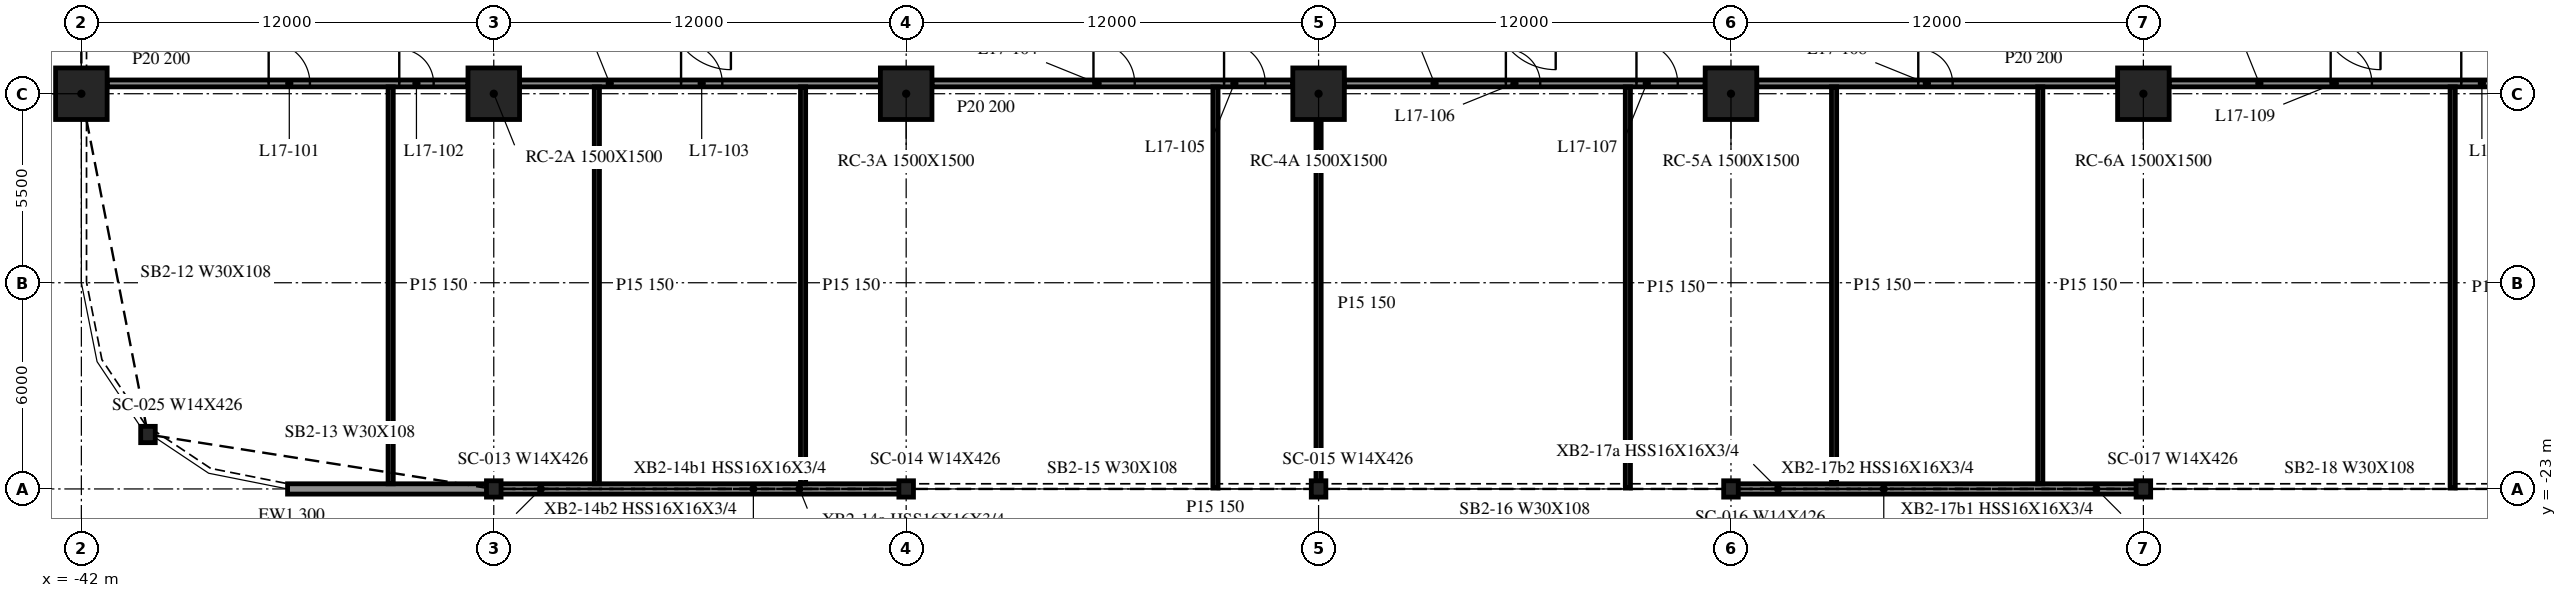
"""IFC4 building model, lengths in metres.
Left out: names, types, materials, properties, quantities, classifications, styles, units other than length and angle.
Written with IfcOpenShell. Run it as: python <this file> out.ifc"""

import sys

from ifc_helpers import new_model, si_unit, direction, frame, frame_2d, origin, origin_2d, place, context, subcontext, project, spatial, rectangle, i_section, extrude, element, fill, save


model = new_model("IFC4")
c1 = context("Model", 3, precision=1e-05, world=origin(), true_north=direction((0.0, 1.0)))
c2 = subcontext(c1, "Body", "Model", "MODEL_VIEW")
j1 = project(units=[si_unit("LENGTHUNIT", "METRE"), si_unit("PLANEANGLEUNIT", "RADIAN")], contexts=[c1])
p1 = place(None, origin())
s1 = spatial("IfcSite", under=j1, at=p1, CompositionType="ELEMENT")
p2 = place(p1, origin())
s2 = spatial("IfcBuilding", under=s1, at=p2, CompositionType="ELEMENT")
p3 = place(p2, frame((0.0, 0.0, 76.1)))
s3 = spatial("IfcBuildingStorey", under=s2, at=p3, CompositionType="ELEMENT", Elevation=76.1)
for number, where, z_axis, x_axis in (
    (1, (-42.0, -11.5, -0.34), (0.0, 0.0, 1.0), (1.0, 0.0, 0.0)),
    (2, (-30.0, -11.5, -0.34), (0.0, 0.0, 1.0), (1.0, 0.0, 0.0)),
    (3, (-18.0, -11.5, -0.34), (0.0, 0.0, 1.0), (1.0, 0.0, 0.0)),
    (4, (-6.0, -11.5, -0.34), (0.0, 0.0, 1.0), (1.0, 0.0, 0.0)),
    (5, (6.0, -11.5, -0.34), (0.0, 0.0, 1.0), (1.0, 0.0, 0.0)),
    (6, (18.0, -11.5, -0.34), (0.0, 0.0, 1.0), (1.0, 0.0, 0.0)),
):
    element("IfcColumn", number, at=place(p3, frame(where, z_axis=z_axis, x_axis=x_axis)), inside=s3, PredefinedType="COLUMN", context=c2, shape_type="SweptSolid", body=[
        extrude(rectangle(XDim=1.5, YDim=1.5, at=origin_2d()), origin(), (0.0, 0.0, 1.0), 4.09),
    ])
for number, where, z_axis, x_axis in (
    (7, (-40.062, -21.416, -0.34), (0.0, 0.0, 1.0), (1.0, 0.0, 0.0)),
    (8, (-30.0, -23.0, -0.34), (0.0, 0.0, 1.0), (1.0, 0.0, 0.0)),
    (9, (-18.0, -23.0, -0.34), (0.0, 0.0, 1.0), (1.0, 0.0, 0.0)),
    (10, (-6.0, -23.0, -0.34), (0.0, 0.0, 1.0), (1.0, 0.0, 0.0)),
    (11, (6.0, -23.0, -0.34), (0.0, 0.0, 1.0), (1.0, 0.0, 0.0)),
    (12, (18.0, -23.0, -0.34), (0.0, 0.0, 1.0), (1.0, 0.0, 0.0)),
):
    element("IfcColumn", number, at=place(p3, frame(where, z_axis=z_axis, x_axis=x_axis)), inside=s3, PredefinedType="COLUMN", context=c2, shape_type="SweptSolid", body=[
        extrude(i_section(OverallWidth=0.424, OverallDepth=0.475, WebThickness=0.048, FlangeThickness=0.077, at=origin_2d()), origin(), (0.0, 0.0, 1.0), 4.09),
    ])
p4 = place(p3, frame((-36.0, -23.0, 0.0), z_axis=(0.0, 0.0, 1.0), x_axis=(1.0, 0.0, 0.0)))
e13 = element("IfcWall", 13, at=p4, inside=s3, PredefinedType="NOTDEFINED", context=c2, shape_type="SweptSolid", body=[
    extrude(rectangle(XDim=5.976, YDim=0.3, at=frame_2d((2.988, 0.0))), origin(), (0.0, 0.0, 1.0), 3.75),
])
for number, where, z_axis, x_axis in (
    (14, (-29.976, -23.0, 0.0), (0.0, 0.0, 1.0), (1.0, 0.0, 0.0)),
    (15, (6.024, -23.0, 0.0), (0.0, 0.0, 1.0), (1.0, 0.0, 0.0)),
):
    element("IfcWall", number, at=place(p3, frame(where, z_axis=z_axis, x_axis=x_axis)), inside=s3, PredefinedType="NOTDEFINED", context=c2, shape_type="SweptSolid", body=[
        extrude(rectangle(XDim=11.952, YDim=0.3, at=frame_2d((5.976, 0.0))), origin(), (0.0, 0.0, 1.0), 3.75),
    ])
p5 = place(p3, frame((-41.25, -11.2, 0.0), z_axis=(0.0, 0.0, 1.0), x_axis=(1.0, 0.0, 0.0)))
e16 = element("IfcWall", 16, at=p5, inside=s3, PredefinedType="PARTITIONING", context=c2, shape_type="SweptSolid", body=[
    extrude(rectangle(XDim=10.5, YDim=0.2, at=frame_2d((5.25, 0.0))), origin(), (0.0, 0.0, 1.0), 3.75),
])
p6 = place(p5, frame((4.7, 0.0, 0.0)))
e17 = element("IfcOpeningElement", 17, at=p6, cuts=e16, PredefinedType="OPENING", context=c2, shape_type="SweptSolid", body=[
    extrude(rectangle(XDim=1.2, YDim=2.1, at=frame_2d((0.6, 1.05))), frame((0.0, 0.11, 0.0), z_axis=(0.0, -1.0, 0.0), x_axis=(1.0, 0.0, 0.0)), (0.0, 0.0, 1.0), 0.22),
])
p7 = place(p5, frame((8.5, 0.0, 0.0)))
e18 = element("IfcOpeningElement", 18, at=p7, cuts=e16, PredefinedType="OPENING", context=c2, shape_type="SweptSolid", body=[
    extrude(rectangle(XDim=1.0, YDim=2.1, at=frame_2d((0.5, 1.05))), frame((0.0, 0.11, 0.0), z_axis=(0.0, -1.0, 0.0), x_axis=(1.0, 0.0, 0.0)), (0.0, 0.0, 1.0), 0.22),
])
p8 = place(p3, frame((-29.25, -11.2, 0.0), z_axis=(0.0, 0.0, 1.0), x_axis=(1.0, 0.0, 0.0)))
e19 = element("IfcWall", 19, at=p8, inside=s3, PredefinedType="PARTITIONING", context=c2, shape_type="SweptSolid", body=[
    extrude(rectangle(XDim=10.5, YDim=0.2, at=frame_2d((5.25, 0.0))), origin(), (0.0, 0.0, 1.0), 3.75),
])
p9 = place(p8, frame((4.7, 0.0, 0.0)))
e20 = element("IfcOpeningElement", 20, at=p9, cuts=e19, PredefinedType="OPENING", context=c2, shape_type="SweptSolid", body=[
    extrude(rectangle(XDim=1.2, YDim=2.1, at=frame_2d((0.6, 1.05))), frame((0.0, 0.11, 0.0), z_axis=(0.0, -1.0, 0.0), x_axis=(1.0, 0.0, 0.0)), (0.0, 0.0, 1.0), 0.22),
])
p10 = place(p3, frame((-17.25, -11.2, 0.0), z_axis=(0.0, 0.0, 1.0), x_axis=(1.0, 0.0, 0.0)))
e21 = element("IfcWall", 21, at=p10, inside=s3, PredefinedType="PARTITIONING", context=c2, shape_type="SweptSolid", body=[
    extrude(rectangle(XDim=10.5, YDim=0.2, at=frame_2d((5.25, 0.0))), origin(), (0.0, 0.0, 1.0), 3.75),
])
p11 = place(p10, frame((4.7, 0.0, 0.0)))
e22 = element("IfcOpeningElement", 22, at=p11, cuts=e21, PredefinedType="OPENING", context=c2, shape_type="SweptSolid", body=[
    extrude(rectangle(XDim=1.2, YDim=2.1, at=frame_2d((0.6, 1.05))), frame((0.0, 0.11, 0.0), z_axis=(0.0, -1.0, 0.0), x_axis=(1.0, 0.0, 0.0)), (0.0, 0.0, 1.0), 0.22),
])
p12 = place(p10, frame((8.5, 0.0, 0.0)))
e23 = element("IfcOpeningElement", 23, at=p12, cuts=e21, PredefinedType="OPENING", context=c2, shape_type="SweptSolid", body=[
    extrude(rectangle(XDim=1.2, YDim=2.1, at=frame_2d((0.6, 1.05))), frame((0.0, 0.11, 0.0), z_axis=(0.0, -1.0, 0.0), x_axis=(1.0, 0.0, 0.0)), (0.0, 0.0, 1.0), 0.22),
])
p13 = place(p3, frame((-5.25, -11.2, 0.0), z_axis=(0.0, 0.0, 1.0), x_axis=(1.0, 0.0, 0.0)))
e24 = element("IfcWall", 24, at=p13, inside=s3, PredefinedType="PARTITIONING", context=c2, shape_type="SweptSolid", body=[
    extrude(rectangle(XDim=10.5, YDim=0.2, at=frame_2d((5.25, 0.0))), origin(), (0.0, 0.0, 1.0), 3.75),
])
p14 = place(p13, frame((4.7, 0.0, 0.0)))
e25 = element("IfcOpeningElement", 25, at=p14, cuts=e24, PredefinedType="OPENING", context=c2, shape_type="SweptSolid", body=[
    extrude(rectangle(XDim=1.0, YDim=2.1, at=frame_2d((0.5, 1.05))), frame((0.0, 0.11, 0.0), z_axis=(0.0, -1.0, 0.0), x_axis=(1.0, 0.0, 0.0)), (0.0, 0.0, 1.0), 0.22),
])
p15 = place(p13, frame((8.5, 0.0, 0.0)))
e26 = element("IfcOpeningElement", 26, at=p15, cuts=e24, PredefinedType="OPENING", context=c2, shape_type="SweptSolid", body=[
    extrude(rectangle(XDim=1.2, YDim=2.1, at=frame_2d((0.6, 1.05))), frame((0.0, 0.11, 0.0), z_axis=(0.0, -1.0, 0.0), x_axis=(1.0, 0.0, 0.0)), (0.0, 0.0, 1.0), 0.22),
])
p16 = place(p3, frame((6.75, -11.2, 0.0), z_axis=(0.0, 0.0, 1.0), x_axis=(1.0, 0.0, 0.0)))
e27 = element("IfcWall", 27, at=p16, inside=s3, PredefinedType="PARTITIONING", context=c2, shape_type="SweptSolid", body=[
    extrude(rectangle(XDim=10.5, YDim=0.2, at=frame_2d((5.25, 0.0))), origin(), (0.0, 0.0, 1.0), 3.75),
])
p17 = place(p16, frame((4.7, 0.0, 0.0)))
e28 = element("IfcOpeningElement", 28, at=p17, cuts=e27, PredefinedType="OPENING", context=c2, shape_type="SweptSolid", body=[
    extrude(rectangle(XDim=1.0, YDim=2.1, at=frame_2d((0.5, 1.05))), frame((0.0, 0.11, 0.0), z_axis=(0.0, -1.0, 0.0), x_axis=(1.0, 0.0, 0.0)), (0.0, 0.0, 1.0), 0.22),
])
p18 = place(p3, frame((18.75, -11.2, 0.0), z_axis=(0.0, 0.0, 1.0), x_axis=(1.0, 0.0, 0.0)))
e29 = element("IfcWall", 29, at=p18, inside=s3, PredefinedType="PARTITIONING", context=c2, shape_type="SweptSolid", body=[
    extrude(rectangle(XDim=10.5, YDim=0.2, at=frame_2d((5.25, 0.0))), origin(), (0.0, 0.0, 1.0), 3.75),
])
p19 = place(p18, frame((4.7, 0.0, 0.0)))
e30 = element("IfcOpeningElement", 30, at=p19, cuts=e29, PredefinedType="OPENING", context=c2, shape_type="SweptSolid", body=[
    extrude(rectangle(XDim=1.2, YDim=2.1, at=frame_2d((0.6, 1.05))), frame((0.0, 0.11, 0.0), z_axis=(0.0, -1.0, 0.0), x_axis=(1.0, 0.0, 0.0)), (0.0, 0.0, 1.0), 0.22),
])
p20 = place(p18, frame((8.5, 0.0, 0.0)))
e31 = element("IfcOpeningElement", 31, at=p20, cuts=e29, PredefinedType="OPENING", context=c2, shape_type="SweptSolid", body=[
    extrude(rectangle(XDim=1.2, YDim=2.1, at=frame_2d((0.6, 1.05))), frame((0.0, 0.11, 0.0), z_axis=(0.0, -1.0, 0.0), x_axis=(1.0, 0.0, 0.0)), (0.0, 0.0, 1.0), 0.22),
])
for number, where, z_axis, x_axis in (
    (32, (-33.0, -22.85, 0.0), (0.0, 0.0, 1.0), (0.0, 1.0, 0.0)),
    (33, (-27.0, -22.85, 0.0), (0.0, 0.0, 1.0), (0.0, 1.0, 0.0)),
    (34, (-21.0, -22.85, 0.0), (0.0, 0.0, 1.0), (0.0, 1.0, 0.0)),
):
    element("IfcWall", number, at=place(p3, frame(where, z_axis=z_axis, x_axis=x_axis)), inside=s3, PredefinedType="PARTITIONING", context=c2, shape_type="SweptSolid", body=[
        extrude(rectangle(XDim=11.55, YDim=0.15, at=frame_2d((5.775, 0.0))), origin(), (0.0, 0.0, 1.0), 3.75),
    ])
p21 = place(p3, frame((-9.0, -22.975, 0.0), z_axis=(0.0, 0.0, 1.0), x_axis=(0.0, 1.0, 0.0)))
e35 = element("IfcWall", 35, at=p21, inside=s3, PredefinedType="PARTITIONING", context=c2, shape_type="SweptSolid", body=[
    extrude(rectangle(XDim=11.675, YDim=0.15, at=frame_2d((5.837, 0.0))), origin(), (0.0, 0.0, 1.0), 3.75),
])
p22 = place(p3, frame((-6.0, -22.975, 0.0), z_axis=(0.0, 0.0, 1.0), x_axis=(0.0, 1.0, 0.0)))
e36 = element("IfcWall", 36, at=p22, inside=s3, PredefinedType="PARTITIONING", context=c2, shape_type="SweptSolid", body=[
    extrude(rectangle(XDim=10.725, YDim=0.15, at=frame_2d((5.363, 0.0))), origin(), (0.0, 0.0, 1.0), 2.751),
])
p23 = place(p3, frame((3.0, -22.975, 0.0), z_axis=(0.0, 0.0, 1.0), x_axis=(0.0, 1.0, 0.0)))
e37 = element("IfcWall", 37, at=p23, inside=s3, PredefinedType="PARTITIONING", context=c2, shape_type="SweptSolid", body=[
    extrude(rectangle(XDim=11.675, YDim=0.15, at=frame_2d((5.837, 0.0))), origin(), (0.0, 0.0, 1.0), 3.75),
])
for number, where, z_axis, x_axis in (
    (38, (9.0, -22.85, 0.0), (0.0, 0.0, 1.0), (0.0, 1.0, 0.0)),
    (39, (15.0, -22.85, 0.0), (0.0, 0.0, 1.0), (0.0, 1.0, 0.0)),
):
    element("IfcWall", number, at=place(p3, frame(where, z_axis=z_axis, x_axis=x_axis)), inside=s3, PredefinedType="PARTITIONING", context=c2, shape_type="SweptSolid", body=[
        extrude(rectangle(XDim=11.55, YDim=0.15, at=frame_2d((5.775, 0.0))), origin(), (0.0, 0.0, 1.0), 3.75),
    ])
p24 = place(p3, frame((27.0, -22.975, 0.0), z_axis=(0.0, 0.0, 1.0), x_axis=(0.0, 1.0, 0.0)))
e40 = element("IfcWall", 40, at=p24, inside=s3, PredefinedType="PARTITIONING", context=c2, shape_type="SweptSolid", body=[
    extrude(rectangle(XDim=11.675, YDim=0.15, at=frame_2d((5.837, 0.0))), origin(), (0.0, 0.0, 1.0), 3.75),
])
p25 = place(p6, origin())
e41 = element("IfcDoor", 41, at=p25, inside=s3, OperationType="SINGLE_SWING_LEFT", PredefinedType="DOOR", context=c2, shape_type="SweptSolid", body=[
    extrude(rectangle(XDim=1.2, YDim=2.1, at=frame_2d((0.6, 1.05))), frame((0.0, 0.025, 0.0), z_axis=(0.0, -1.0, 0.0), x_axis=(1.0, 0.0, 0.0)), (0.0, 0.0, 1.0), 0.05),
])
fill(e17, e41)
p26 = place(p7, origin())
e42 = element("IfcDoor", 42, at=p26, inside=s3, OperationType="SINGLE_SWING_LEFT", PredefinedType="DOOR", context=c2, shape_type="SweptSolid", body=[
    extrude(rectangle(XDim=1.0, YDim=2.1, at=frame_2d((0.5, 1.05))), frame((0.0, 0.025, 0.0), z_axis=(0.0, -1.0, 0.0), x_axis=(1.0, 0.0, 0.0)), (0.0, 0.0, 1.0), 0.05),
])
fill(e18, e42)
p27 = place(p9, origin())
e43 = element("IfcDoor", 43, at=p27, inside=s3, OperationType="SINGLE_SWING_LEFT", PredefinedType="DOOR", context=c2, shape_type="SweptSolid", body=[
    extrude(rectangle(XDim=1.2, YDim=2.1, at=frame_2d((0.6, 1.05))), frame((0.0, 0.025, 0.0), z_axis=(0.0, -1.0, 0.0), x_axis=(1.0, 0.0, 0.0)), (0.0, 0.0, 1.0), 0.05),
])
fill(e20, e43)
p28 = place(p11, origin())
e44 = element("IfcDoor", 44, at=p28, inside=s3, OperationType="SINGLE_SWING_LEFT", PredefinedType="DOOR", context=c2, shape_type="SweptSolid", body=[
    extrude(rectangle(XDim=1.2, YDim=2.1, at=frame_2d((0.6, 1.05))), frame((0.0, 0.025, 0.0), z_axis=(0.0, -1.0, 0.0), x_axis=(1.0, 0.0, 0.0)), (0.0, 0.0, 1.0), 0.05),
])
fill(e22, e44)
p29 = place(p12, origin())
e45 = element("IfcDoor", 45, at=p29, inside=s3, OperationType="SINGLE_SWING_LEFT", PredefinedType="DOOR", context=c2, shape_type="SweptSolid", body=[
    extrude(rectangle(XDim=1.2, YDim=2.1, at=frame_2d((0.6, 1.05))), frame((0.0, 0.025, 0.0), z_axis=(0.0, -1.0, 0.0), x_axis=(1.0, 0.0, 0.0)), (0.0, 0.0, 1.0), 0.05),
])
fill(e23, e45)
p30 = place(p14, origin())
e46 = element("IfcDoor", 46, at=p30, inside=s3, OperationType="SINGLE_SWING_RIGHT", PredefinedType="DOOR", context=c2, shape_type="SweptSolid", body=[
    extrude(rectangle(XDim=1.0, YDim=2.1, at=frame_2d((0.5, 1.05))), frame((0.0, 0.025, 0.0), z_axis=(0.0, -1.0, 0.0), x_axis=(1.0, 0.0, 0.0)), (0.0, 0.0, 1.0), 0.05),
])
fill(e25, e46)
p31 = place(p15, origin())
e47 = element("IfcDoor", 47, at=p31, inside=s3, OperationType="SINGLE_SWING_LEFT", PredefinedType="DOOR", context=c2, shape_type="SweptSolid", body=[
    extrude(rectangle(XDim=1.2, YDim=2.1, at=frame_2d((0.6, 1.05))), frame((0.0, 0.025, 0.0), z_axis=(0.0, -1.0, 0.0), x_axis=(1.0, 0.0, 0.0)), (0.0, 0.0, 1.0), 0.05),
])
fill(e26, e47)
p32 = place(p17, origin())
e48 = element("IfcDoor", 48, at=p32, inside=s3, OperationType="SINGLE_SWING_RIGHT", PredefinedType="DOOR", context=c2, shape_type="SweptSolid", body=[
    extrude(rectangle(XDim=1.0, YDim=2.1, at=frame_2d((0.5, 1.05))), frame((0.0, 0.025, 0.0), z_axis=(0.0, -1.0, 0.0), x_axis=(1.0, 0.0, 0.0)), (0.0, 0.0, 1.0), 0.05),
])
fill(e28, e48)
p33 = place(p19, origin())
e49 = element("IfcDoor", 49, at=p33, inside=s3, OperationType="SINGLE_SWING_LEFT", PredefinedType="DOOR", context=c2, shape_type="SweptSolid", body=[
    extrude(rectangle(XDim=1.2, YDim=2.1, at=frame_2d((0.6, 1.05))), frame((0.0, 0.025, 0.0), z_axis=(0.0, -1.0, 0.0), x_axis=(1.0, 0.0, 0.0)), (0.0, 0.0, 1.0), 0.05),
])
fill(e30, e49)
p34 = place(p20, origin())
e50 = element("IfcDoor", 50, at=p34, inside=s3, OperationType="SINGLE_SWING_LEFT", PredefinedType="DOOR", context=c2, shape_type="SweptSolid", body=[
    extrude(rectangle(XDim=1.2, YDim=2.1, at=frame_2d((0.6, 1.05))), frame((0.0, 0.025, 0.0), z_axis=(0.0, -1.0, 0.0), x_axis=(1.0, 0.0, 0.0)), (0.0, 0.0, 1.0), 0.05),
])
fill(e31, e50)
save(model, sys.argv[1])
